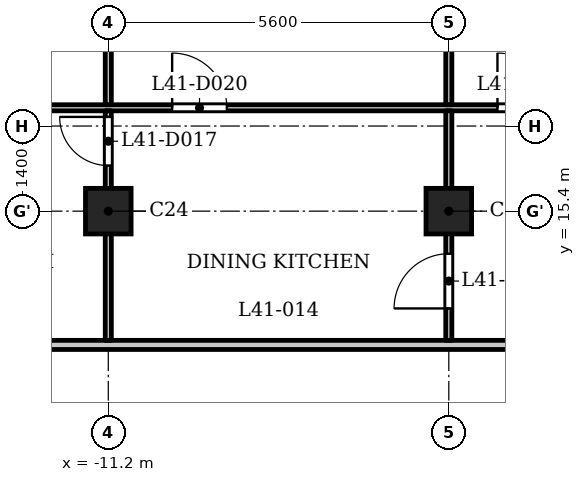
"""IFC4 building model, lengths in metres.
Left out: names, types, materials, properties, quantities, classifications, styles, units other than length and angle.
Written with IfcOpenShell. Run it as: python <this file> out.ifc"""

import sys

from ifc_helpers import new_model, si_unit, direction, frame, frame_2d, origin, origin_2d, place, context, subcontext, project, spatial, rectangle, extrude, element, fill, save


model = new_model("IFC4")
c1 = context("Model", 3, precision=1e-05, world=origin(), true_north=direction((0.0, 1.0)))
c2 = subcontext(c1, "Body", "Model", "MODEL_VIEW")
j1 = project(units=[si_unit("LENGTHUNIT", "METRE"), si_unit("PLANEANGLEUNIT", "RADIAN")], contexts=[c1])
p1 = place(None, origin())
s1 = spatial("IfcSite", under=j1, at=p1, CompositionType="ELEMENT")
p2 = place(p1, origin())
s2 = spatial("IfcBuilding", under=s1, at=p2, CompositionType="ELEMENT")
p3 = place(p2, frame((0.0, 0.0, 160.6)))
s3 = spatial("IfcBuildingStorey", under=s2, at=p3, CompositionType="ELEMENT", Elevation=160.6)
for number, where, z_axis, x_axis in (
    (1, (-11.2, 15.4, 0.0), (0.0, 0.0, 1.0), (1.0, 0.0, 0.0)),
    (2, (-5.6, 15.4, 0.0), (0.0, 0.0, 1.0), (1.0, 0.0, 0.0)),
):
    element("IfcColumn", number, at=place(p3, frame(where, z_axis=z_axis, x_axis=x_axis)), inside=s3, PredefinedType="COLUMN", context=c2, shape_type="SweptSolid", body=[
        extrude(rectangle(XDim=0.75, YDim=0.75, at=origin_2d()), origin(), (0.0, 0.0, 1.0), 3.5),
    ])
p4 = place(p3, frame((-17.4, 13.2, 0.0), z_axis=(0.0, 0.0, 1.0), x_axis=(1.0, 0.0, 0.0)))
e3 = element("IfcWall", 3, at=p4, inside=s3, PredefinedType="PARTITIONING", context=c2, shape_type="SweptSolid", body=[
    extrude(rectangle(XDim=34.8, YDim=0.15, at=frame_2d((17.4, 0.0))), origin(), (0.0, 0.0, 1.0), 3.2),
])
p5 = place(p4, frame((0.25, 0.0, 0.0)))
e4 = element("IfcOpeningElement", 4, at=p5, cuts=e3, PredefinedType="OPENING", context=c2, shape_type="SweptSolid", body=[
    extrude(rectangle(XDim=1.0, YDim=2.1, at=frame_2d((0.5, 1.05))), frame((0.0, 0.085, 0.0), z_axis=(0.0, -1.0, 0.0), x_axis=(1.0, 0.0, 0.0)), (0.0, 0.0, 1.0), 0.17),
])
p6 = place(p4, frame((33.65, 0.0, 0.0)))
e5 = element("IfcOpeningElement", 5, at=p6, cuts=e3, PredefinedType="OPENING", context=c2, shape_type="SweptSolid", body=[
    extrude(rectangle(XDim=1.0, YDim=2.1, at=frame_2d((0.5, 1.05))), frame((0.0, 0.085, 0.0), z_axis=(0.0, -1.0, 0.0), x_axis=(1.0, 0.0, 0.0)), (0.0, 0.0, 1.0), 0.17),
])
p7 = place(p4, frame((15.75, 0.0, 0.0)))
e6 = element("IfcOpeningElement", 6, at=p7, cuts=e3, PredefinedType="OPENING", context=c2, shape_type="SweptSolid", body=[
    extrude(rectangle(XDim=1.0, YDim=2.1, at=frame_2d((0.5, 1.05))), frame((0.0, 0.085, 0.0), z_axis=(0.0, -1.0, 0.0), x_axis=(1.0, 0.0, 0.0)), (0.0, 0.0, 1.0), 0.17),
])
p8 = place(p4, frame((20.85, 0.0, 0.0)))
e7 = element("IfcOpeningElement", 7, at=p8, cuts=e3, PredefinedType="OPENING", context=c2, shape_type="SweptSolid", body=[
    extrude(rectangle(XDim=1.0, YDim=2.1, at=frame_2d((0.5, 1.05))), frame((0.0, 0.085, 0.0), z_axis=(0.0, -1.0, 0.0), x_axis=(1.0, 0.0, 0.0)), (0.0, 0.0, 1.0), 0.17),
])
p9 = place(p4, frame((23.55, 0.0, 0.0)))
e8 = element("IfcOpeningElement", 8, at=p9, cuts=e3, PredefinedType="OPENING", context=c2, shape_type="SweptSolid", body=[
    extrude(rectangle(XDim=1.0, YDim=2.1, at=frame_2d((0.5, 1.05))), frame((0.0, 0.085, 0.0), z_axis=(0.0, -1.0, 0.0), x_axis=(1.0, 0.0, 0.0)), (0.0, 0.0, 1.0), 0.17),
])
p10 = place(p3, frame((-16.725, 17.1, 0.0), z_axis=(0.0, 0.0, 1.0), x_axis=(1.0, 0.0, 0.0)))
e9 = element("IfcWall", 9, at=p10, inside=s3, PredefinedType="PARTITIONING", context=c2, shape_type="SweptSolid", body=[
    extrude(rectangle(XDim=33.45, YDim=0.1, at=frame_2d((16.725, 0.0))), origin(), (0.0, 0.0, 1.0), 3.2),
])
p11 = place(p10, frame((11.925, 0.0, 0.0)))
e10 = element("IfcOpeningElement", 10, at=p11, cuts=e9, PredefinedType="OPENING", context=c2, shape_type="SweptSolid", body=[
    extrude(rectangle(XDim=0.9, YDim=2.1, at=frame_2d((0.45, 1.05))), frame((0.0, 0.06, 0.0), z_axis=(0.0, -1.0, 0.0), x_axis=(1.0, 0.0, 0.0)), (0.0, 0.0, 1.0), 0.12),
])
p12 = place(p10, frame((15.175, 0.0, 0.0)))
e11 = element("IfcOpeningElement", 11, at=p12, cuts=e9, PredefinedType="OPENING", context=c2, shape_type="SweptSolid", body=[
    extrude(rectangle(XDim=0.9, YDim=2.1, at=frame_2d((0.45, 1.05))), frame((0.0, 0.06, 0.0), z_axis=(0.0, -1.0, 0.0), x_axis=(1.0, 0.0, 0.0)), (0.0, 0.0, 1.0), 0.12),
])
p13 = place(p10, frame((6.575, 0.0, 0.0)))
e12 = element("IfcOpeningElement", 12, at=p13, cuts=e9, PredefinedType="OPENING", context=c2, shape_type="SweptSolid", body=[
    extrude(rectangle(XDim=0.9, YDim=2.1, at=frame_2d((0.45, 1.05))), frame((0.0, 0.06, 0.0), z_axis=(0.0, -1.0, 0.0), x_axis=(1.0, 0.0, 0.0)), (0.0, 0.0, 1.0), 0.12),
])
p14 = place(p10, frame((17.375, 0.0, 0.0)))
e13 = element("IfcOpeningElement", 13, at=p14, cuts=e9, PredefinedType="OPENING", context=c2, shape_type="SweptSolid", body=[
    extrude(rectangle(XDim=0.8, YDim=2.1, at=frame_2d((0.4, 1.05))), frame((0.0, 0.06, 0.0), z_axis=(0.0, -1.0, 0.0), x_axis=(1.0, 0.0, 0.0)), (0.0, 0.0, 1.0), 0.12),
])
p15 = place(p10, frame((20.025, 0.0, 0.0)))
e14 = element("IfcOpeningElement", 14, at=p15, cuts=e9, PredefinedType="OPENING", context=c2, shape_type="SweptSolid", body=[
    extrude(rectangle(XDim=0.9, YDim=2.1, at=frame_2d((0.45, 1.05))), frame((0.0, 0.06, 0.0), z_axis=(0.0, -1.0, 0.0), x_axis=(1.0, 0.0, 0.0)), (0.0, 0.0, 1.0), 0.12),
])
p16 = place(p10, frame((26.425, 0.0, 0.0)))
e15 = element("IfcOpeningElement", 15, at=p16, cuts=e9, PredefinedType="OPENING", context=c2, shape_type="SweptSolid", body=[
    extrude(rectangle(XDim=0.8, YDim=2.1, at=frame_2d((0.4, 1.05))), frame((0.0, 0.06, 0.0), z_axis=(0.0, -1.0, 0.0), x_axis=(1.0, 0.0, 0.0)), (0.0, 0.0, 1.0), 0.12),
])
p17 = place(p10, frame((23.025, 0.0, 0.0)))
e16 = element("IfcOpeningElement", 16, at=p17, cuts=e9, PredefinedType="OPENING", context=c2, shape_type="SweptSolid", body=[
    extrude(rectangle(XDim=0.9, YDim=2.1, at=frame_2d((0.45, 1.05))), frame((0.0, 0.06, 0.0), z_axis=(0.0, -1.0, 0.0), x_axis=(1.0, 0.0, 0.0)), (0.0, 0.0, 1.0), 0.12),
])
p18 = place(p10, frame((28.575, 0.0, 0.0)))
e17 = element("IfcOpeningElement", 17, at=p18, cuts=e9, PredefinedType="OPENING", context=c2, shape_type="SweptSolid", body=[
    extrude(rectangle(XDim=0.8, YDim=2.1, at=frame_2d((0.4, 1.05))), frame((0.0, 0.06, 0.0), z_axis=(0.0, -1.0, 0.0), x_axis=(1.0, 0.0, 0.0)), (0.0, 0.0, 1.0), 0.12),
])
p19 = place(p10, frame((30.725, 0.0, 0.0)))
e18 = element("IfcOpeningElement", 18, at=p19, cuts=e9, PredefinedType="OPENING", context=c2, shape_type="SweptSolid", body=[
    extrude(rectangle(XDim=0.9, YDim=2.1, at=frame_2d((0.45, 1.05))), frame((0.0, 0.06, 0.0), z_axis=(0.0, -1.0, 0.0), x_axis=(1.0, 0.0, 0.0)), (0.0, 0.0, 1.0), 0.12),
])
p20 = place(p3, frame((-11.2, 13.275, 0.0), z_axis=(0.0, 0.0, 1.0), x_axis=(0.0, 1.0, 0.0)))
e19 = element("IfcWall", 19, at=p20, inside=s3, PredefinedType="PARTITIONING", context=c2, shape_type="SweptSolid", body=[
    extrude(rectangle(XDim=3.775, YDim=0.1, at=frame_2d((1.888, 0.0))), origin(), (0.0, 0.0, 1.0), 3.2),
])
p21 = place(p20, frame((2.875, 0.0, 0.0)))
e20 = element("IfcOpeningElement", 20, at=p21, cuts=e19, PredefinedType="OPENING", context=c2, shape_type="SweptSolid", body=[
    extrude(rectangle(XDim=0.8, YDim=2.1, at=frame_2d((0.4, 1.05))), frame((0.0, 0.06, 0.0), z_axis=(0.0, -1.0, 0.0), x_axis=(1.0, 0.0, 0.0)), (0.0, 0.0, 1.0), 0.12),
])
p22 = place(p3, frame((-11.2, 17.15, 0.0), z_axis=(0.0, 0.0, 1.0), x_axis=(0.0, 1.0, 0.0)))
e21 = element("IfcWall", 21, at=p22, inside=s3, PredefinedType="PARTITIONING", context=c2, shape_type="SweptSolid", body=[
    extrude(rectangle(XDim=5.73, YDim=0.1, at=frame_2d((2.865, 0.0))), origin(), (0.0, 0.0, 1.0), 3.2),
])
p23 = place(p22, frame((3.61, 0.0, 0.0)))
e22 = element("IfcOpeningElement", 22, at=p23, cuts=e21, PredefinedType="OPENING", context=c2, shape_type="SweptSolid", body=[
    extrude(rectangle(XDim=0.9, YDim=2.1, at=frame_2d((0.45, 1.05))), frame((0.0, 0.06, 0.0), z_axis=(0.0, -1.0, 0.0), x_axis=(1.0, 0.0, 0.0)), (0.0, 0.0, 1.0), 0.12),
])
p24 = place(p3, frame((-5.6, 13.275, 0.0), z_axis=(0.0, 0.0, 1.0), x_axis=(0.0, 1.0, 0.0)))
e23 = element("IfcWall", 23, at=p24, inside=s3, PredefinedType="PARTITIONING", context=c2, shape_type="SweptSolid", body=[
    extrude(rectangle(XDim=3.775, YDim=0.1, at=frame_2d((1.888, 0.0))), origin(), (0.0, 0.0, 1.0), 3.2),
])
p25 = place(p24, frame((0.525, 0.0, 0.0)))
e24 = element("IfcOpeningElement", 24, at=p25, cuts=e23, PredefinedType="OPENING", context=c2, shape_type="SweptSolid", body=[
    extrude(rectangle(XDim=0.9, YDim=2.1, at=frame_2d((0.45, 1.05))), frame((0.0, 0.06, 0.0), z_axis=(0.0, -1.0, 0.0), x_axis=(1.0, 0.0, 0.0)), (0.0, 0.0, 1.0), 0.12),
])
p26 = place(p3, frame((-5.6, 17.15, 0.0), z_axis=(0.0, 0.0, 1.0), x_axis=(0.0, 1.0, 0.0)))
e25 = element("IfcWall", 25, at=p26, inside=s3, PredefinedType="PARTITIONING", context=c2, shape_type="SweptSolid", body=[
    extrude(rectangle(XDim=5.73, YDim=0.1, at=frame_2d((2.865, 0.0))), origin(), (0.0, 0.0, 1.0), 3.2),
])
p27 = place(p25, origin())
e26 = element("IfcDoor", 26, at=p27, inside=s3, OperationType="SINGLE_SWING_RIGHT", PredefinedType="DOOR", context=c2, shape_type="SweptSolid", body=[
    extrude(rectangle(XDim=0.9, YDim=2.1, at=frame_2d((0.45, 1.05))), frame((0.0, 0.025, 0.0), z_axis=(0.0, -1.0, 0.0), x_axis=(1.0, 0.0, 0.0)), (0.0, 0.0, 1.0), 0.05),
])
fill(e24, e26)
p28 = place(p21, origin())
e27 = element("IfcDoor", 27, at=p28, inside=s3, OperationType="SINGLE_SWING_LEFT", PredefinedType="DOOR", context=c2, shape_type="SweptSolid", body=[
    extrude(rectangle(XDim=0.8, YDim=2.1, at=frame_2d((0.4, 1.05))), frame((0.0, 0.025, 0.0), z_axis=(0.0, -1.0, 0.0), x_axis=(1.0, 0.0, 0.0)), (0.0, 0.0, 1.0), 0.05),
])
fill(e20, e27)
p29 = place(p11, origin())
e28 = element("IfcDoor", 28, at=p29, inside=s3, OperationType="SINGLE_SWING_RIGHT", PredefinedType="DOOR", context=c2, shape_type="SweptSolid", body=[
    extrude(rectangle(XDim=0.9, YDim=2.1, at=frame_2d((0.45, 1.05))), frame((0.0, 0.025, 0.0), z_axis=(0.0, -1.0, 0.0), x_axis=(1.0, 0.0, 0.0)), (0.0, 0.0, 1.0), 0.05),
])
fill(e10, e28)
p30 = place(p13, origin())
e29 = element("IfcDoor", 29, at=p30, inside=s3, OperationType="SINGLE_SWING_RIGHT", PredefinedType="DOOR", context=c2, shape_type="SweptSolid", body=[
    extrude(rectangle(XDim=0.9, YDim=2.1, at=frame_2d((0.45, 1.05))), frame((0.0, 0.025, 0.0), z_axis=(0.0, -1.0, 0.0), x_axis=(1.0, 0.0, 0.0)), (0.0, 0.0, 1.0), 0.05),
])
fill(e12, e29)
save(model, sys.argv[1])
